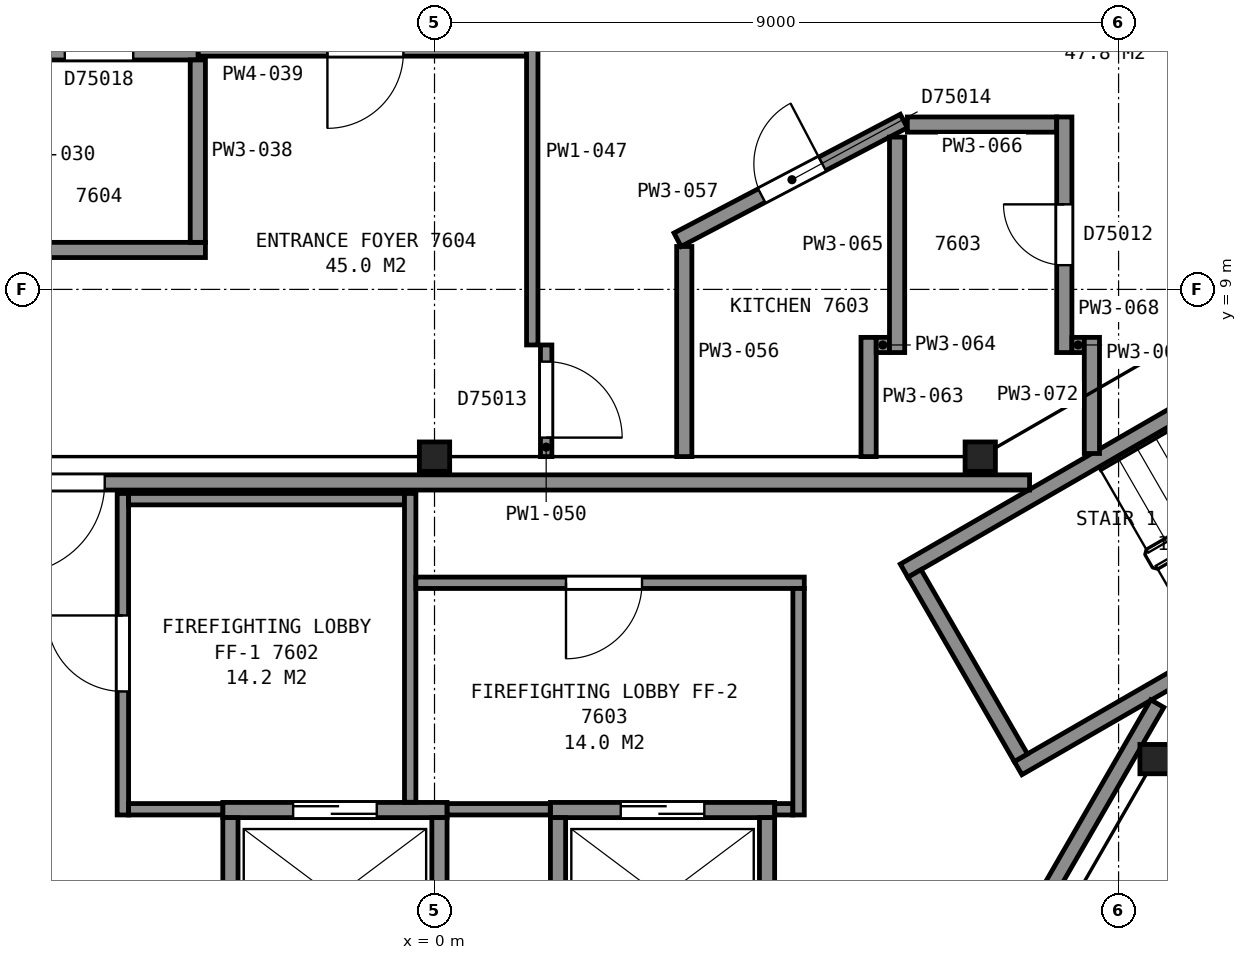
"""IFC4 building model, lengths in metres.
Left out: names, types, materials, properties, quantities, classifications, styles, units other than length and angle.
Written with IfcOpenShell. Run it as: python <this file> out.ifc"""

import sys

from ifc_helpers import new_model, si_unit, direction, frame, frame_2d, origin, origin_2d, place, context, subcontext, project, spatial, rectangle, i_section, extrude, element, fill, save


model = new_model("IFC4")
c1 = context("Model", 3, precision=1e-05, world=origin(), true_north=direction((0.0, 1.0)))
c2 = subcontext(c1, "Body", "Model", "MODEL_VIEW")
j1 = project(units=[si_unit("LENGTHUNIT", "METRE"), si_unit("PLANEANGLEUNIT", "RADIAN")], contexts=[c1])
p1 = place(None, origin())
s1 = spatial("IfcSite", under=j1, at=p1, CompositionType="ELEMENT")
p2 = place(p1, origin())
s2 = spatial("IfcBuilding", under=s1, at=p2, CompositionType="ELEMENT")
p3 = place(p2, frame((0.0, 0.0, 301.0)))
s3 = spatial("IfcBuildingStorey", under=s2, at=p3, CompositionType="ELEMENT", Elevation=301.0)
for number, where, z_axis, x_axis in (
    (1, (9.48, 2.82, 0.0), (0.0, 0.0, 1.0), (1.0, 0.0, 0.0)),
    (2, (7.18, 6.8, 0.0), (0.0, 0.0, 1.0), (1.0, 0.0, 0.0)),
    (3, (0.0, 6.8, 0.0), (0.0, 0.0, 1.0), (1.0, 0.0, 0.0)),
):
    element("IfcColumn", number, at=place(p3, frame(where, z_axis=z_axis, x_axis=x_axis)), inside=s3, PredefinedType="COLUMN", context=c2, shape_type="SweptSolid", body=[
        extrude(i_section(OverallWidth=0.399, OverallDepth=0.386, WebThickness=0.021, FlangeThickness=0.033, FilletRadius=0.015, at=origin_2d()), origin(), (0.0, 0.0, 1.0), 3.7),
    ])
for number, where, z_axis, x_axis in (
    (4, (6.178, 5.299, 0.0), (0.0, 0.0, 1.0), (0.866, 0.5, 0.0)),
    (5, (7.678, 2.701, 0.0), (0.0, 0.0, 1.0), (0.866, 0.5, 0.0)),
):
    element("IfcWall", number, at=place(p3, frame(where, z_axis=z_axis, x_axis=x_axis)), inside=s3, PredefinedType="PARTITIONING", context=c2, shape_type="SweptSolid", body=[
        extrude(rectangle(XDim=7.2, YDim=0.2, at=frame_2d((3.6, 0.0))), origin(), (0.0, 0.0, 1.0), 3.45),
    ])
p4 = place(p3, frame((7.715, 2.838, 0.0), z_axis=(0.0, 0.0, 1.0), x_axis=(-0.500049511043, 0.865996816683, 0.0)))
e6 = element("IfcWall", 6, at=p4, inside=s3, PredefinedType="PARTITIONING", context=c2, shape_type="SweptSolid", body=[
    extrude(rectangle(XDim=2.8, YDim=0.2, at=frame_2d((1.4, 0.0))), origin(), (0.0, 0.0, 1.0), 3.45),
])
p5 = place(p3, frame((-2.785, 2.15, 0.0), z_axis=(0.0, 0.0, 1.0), x_axis=(1.0, 0.0, 0.0)))
e7 = element("IfcWall", 7, at=p5, inside=s3, PredefinedType="PARTITIONING", context=c2, shape_type="SweptSolid", body=[
    extrude(rectangle(XDim=2.95, YDim=0.2, at=frame_2d((1.475, 0.0))), origin(), (0.0, 0.0, 1.0), 3.7),
])
p6 = place(p5, frame((0.925, 0.0, 0.0)))
e8 = element("IfcOpeningElement", 8, at=p6, cuts=e7, PredefinedType="OPENING", context=c2, shape_type="SweptSolid", body=[
    extrude(rectangle(XDim=1.1, YDim=2.1, at=frame_2d((0.55, 1.05))), frame((0.0, 0.11, 0.0), z_axis=(0.0, -1.0, 0.0), x_axis=(1.0, 0.0, 0.0)), (0.0, 0.0, 1.0), 0.22),
])
p7 = place(p3, frame((1.525, 2.15, 0.0), z_axis=(0.0, 0.0, 1.0), x_axis=(1.0, 0.0, 0.0)))
e9 = element("IfcWall", 9, at=p7, inside=s3, PredefinedType="PARTITIONING", context=c2, shape_type="SweptSolid", body=[
    extrude(rectangle(XDim=2.95, YDim=0.2, at=frame_2d((1.475, 0.0))), origin(), (0.0, 0.0, 1.0), 3.7),
])
p8 = place(p7, frame((0.925, 0.0, 0.0)))
e10 = element("IfcOpeningElement", 10, at=p8, cuts=e9, PredefinedType="OPENING", context=c2, shape_type="SweptSolid", body=[
    extrude(rectangle(XDim=1.1, YDim=2.1, at=frame_2d((0.55, 1.05))), frame((0.0, 0.11, 0.0), z_axis=(0.0, -1.0, 0.0), x_axis=(1.0, 0.0, 0.0)), (0.0, 0.0, 1.0), 0.22),
])
for number, where, z_axis, x_axis in (
    (11, (4.375, 0.1, 0.0), (0.0, 0.0, 1.0), (0.0, 1.0, 0.0)),
    (12, (1.625, 0.1, 0.0), (0.0, 0.0, 1.0), (0.0, 1.0, 0.0)),
    (13, (0.065, 0.1, 0.0), (0.0, 0.0, 1.0), (0.0, 1.0, 0.0)),
    (14, (-2.685, 0.1, 0.0), (0.0, 0.0, 1.0), (0.0, 1.0, 0.0)),
):
    element("IfcWall", number, at=place(p3, frame(where, z_axis=z_axis, x_axis=x_axis)), inside=s3, PredefinedType="PARTITIONING", context=c2, shape_type="SweptSolid", body=[
        extrude(rectangle(XDim=1.95, YDim=0.2, at=frame_2d((0.975, 0.0))), origin(), (0.0, 0.0, 1.0), 3.7),
    ])
p9 = place(p3, frame((7.829, 6.46, 0.0), z_axis=(0.0, 0.0, 1.0), x_axis=(-1.0, 0.0, 0.0)))
e15 = element("IfcWall", 15, at=p9, inside=s3, PredefinedType="PARTITIONING", context=c2, shape_type="SweptSolid", body=[
    extrude(rectangle(XDim=15.658, YDim=0.2, at=frame_2d((7.829, 0.0))), origin(), (0.0, 0.0, 1.0), 3.45),
])
p10 = place(p9, frame((12.168, 0.0, 0.0)))
e16 = element("IfcOpeningElement", 16, at=p10, cuts=e15, PredefinedType="OPENING", context=c2, shape_type="SweptSolid", body=[
    extrude(rectangle(XDim=1.2, YDim=2.1, at=frame_2d((0.6, 1.05))), frame((0.0, 0.11, 0.0), z_axis=(0.0, -1.0, 0.0), x_axis=(1.0, 0.0, 0.0)), (0.0, 0.0, 1.0), 0.22),
])
p11 = place(p3, frame((-4.1, 2.085, 0.0), z_axis=(0.0, 0.0, 1.0), x_axis=(0.0, 1.0, 0.0)))
e17 = element("IfcWall", 17, at=p11, inside=s3, PredefinedType="PARTITIONING", context=c2, shape_type="SweptSolid", body=[
    extrude(rectangle(XDim=4.23, YDim=0.15, at=frame_2d((2.115, 0.0))), origin(), (0.0, 0.0, 1.0), 3.45),
])
p12 = place(p11, frame((1.625, 0.0, 0.0)))
e18 = element("IfcOpeningElement", 18, at=p12, cuts=e17, PredefinedType="OPENING", context=c2, shape_type="SweptSolid", body=[
    extrude(rectangle(XDim=1.0, YDim=2.1, at=frame_2d((0.5, 1.05))), frame((0.0, 0.085, 0.0), z_axis=(0.0, -1.0, 0.0), x_axis=(1.0, 0.0, 0.0)), (0.0, 0.0, 1.0), 0.17),
])
p13 = place(p3, frame((-4.025, 2.16, 0.0), z_axis=(0.0, 0.0, 1.0), x_axis=(1.0, 0.0, 0.0)))
e19 = element("IfcWall", 19, at=p13, inside=s3, PredefinedType="PARTITIONING", context=c2, shape_type="SweptSolid", body=[
    extrude(rectangle(XDim=1.238, YDim=0.15, at=frame_2d((0.619, 0.0))), origin(), (0.0, 0.0, 1.0), 3.45),
])
p14 = place(p3, frame((-4.025, 6.24, 0.0), z_axis=(0.0, 0.0, 1.0), x_axis=(1.0, 0.0, 0.0)))
e20 = element("IfcWall", 20, at=p14, inside=s3, PredefinedType="PARTITIONING", context=c2, shape_type="SweptSolid", body=[
    extrude(rectangle(XDim=3.63, YDim=0.15, at=frame_2d((1.815, 0.0))), origin(), (0.0, 0.0, 1.0), 3.45),
])
p15 = place(p3, frame((-0.32, 2.252, 0.0), z_axis=(0.0, 0.0, 1.0), x_axis=(0.0, 1.0, 0.0)))
e21 = element("IfcWall", 21, at=p15, inside=s3, PredefinedType="PARTITIONING", context=c2, shape_type="SweptSolid", body=[
    extrude(rectangle(XDim=4.063, YDim=0.15, at=frame_2d((2.031, 0.0))), origin(), (0.0, 0.0, 1.0), 3.45),
])
p16 = place(p3, frame((-0.245, 5.14, 0.0), z_axis=(0.0, 0.0, 1.0), x_axis=(1.0, 0.0, 0.0)))
e22 = element("IfcWall", 22, at=p16, inside=s3, PredefinedType="PARTITIONING", context=c2, shape_type="SweptSolid", body=[
    extrude(rectangle(XDim=5.11, YDim=0.15, at=frame_2d((2.555, 0.0))), origin(), (0.0, 0.0, 1.0), 3.45),
])
p17 = place(p16, frame((1.975, 0.0, 0.0)))
e23 = element("IfcOpeningElement", 23, at=p17, cuts=e22, PredefinedType="OPENING", context=c2, shape_type="SweptSolid", body=[
    extrude(rectangle(XDim=1.0, YDim=2.1, at=frame_2d((0.5, 1.05))), frame((0.0, 0.085, 0.0), z_axis=(0.0, -1.0, 0.0), x_axis=(1.0, 0.0, 0.0)), (0.0, 0.0, 1.0), 0.17),
])
p18 = place(p3, frame((0.167, 2.16, 0.0), z_axis=(0.0, 0.0, 1.0), x_axis=(1.0, 0.0, 0.0)))
e24 = element("IfcWall", 24, at=p18, inside=s3, PredefinedType="PARTITIONING", context=c2, shape_type="SweptSolid", body=[
    extrude(rectangle(XDim=1.356, YDim=0.15, at=frame_2d((0.678, 0.0))), origin(), (0.0, 0.0, 1.0), 3.45),
])
p19 = place(p3, frame((3.828, -6.29, 0.0), z_axis=(0.0, 0.0, 1.0), x_axis=(0.499979739078, 0.866037101117, 0.0)))
e25 = element("IfcWall", 25, at=p19, inside=s3, PredefinedType="PARTITIONING", context=c2, shape_type="SweptSolid", body=[
    extrude(rectangle(XDim=11.363, YDim=0.2, at=frame_2d((5.681, 0.0))), origin(), (0.0, 0.0, 1.0), 3.45),
])
p20 = place(p19, frame((0.55, 0.0, 0.0)))
e26 = element("IfcOpeningElement", 26, at=p20, cuts=e25, PredefinedType="OPENING", context=c2, shape_type="SweptSolid", body=[
    extrude(rectangle(XDim=1.2, YDim=2.1, at=frame_2d((0.6, 1.05))), frame((0.0, 0.11, 0.0), z_axis=(0.0, -1.0, 0.0), x_axis=(1.0, 0.0, 0.0)), (0.0, 0.0, 1.0), 0.22),
])
p21 = place(p3, frame((4.477, 2.16, 0.0), z_axis=(0.0, 0.0, 1.0), x_axis=(1.0, 0.0, 0.0)))
e27 = element("IfcWall", 27, at=p21, inside=s3, PredefinedType="PARTITIONING", context=c2, shape_type="SweptSolid", body=[
    extrude(rectangle(XDim=0.238, YDim=0.15, at=frame_2d((0.119, 0.0))), origin(), (0.0, 0.0, 1.0), 3.45),
])
p22 = place(p3, frame((4.79, 2.085, 0.0), z_axis=(0.0, 0.0, 1.0), x_axis=(0.0, 1.0, 0.0)))
e28 = element("IfcWall", 28, at=p22, inside=s3, PredefinedType="PARTITIONING", context=c2, shape_type="SweptSolid", body=[
    extrude(rectangle(XDim=2.98, YDim=0.15, at=frame_2d((1.49, 0.0))), origin(), (0.0, 0.0, 1.0), 3.45),
])
p23 = place(p3, frame((-10.838, 9.519, 0.0), z_axis=(0.0, 0.0, 1.0), x_axis=(1.0, 0.0, 0.0)))
e29 = element("IfcWall", 29, at=p23, inside=s3, PredefinedType="PARTITIONING", context=c2, shape_type="SweptSolid", body=[
    extrude(rectangle(XDim=7.824, YDim=0.2, at=frame_2d((3.912, 0.0))), origin(), (0.0, 0.0, 1.0), 2.723),
])
p24 = place(p3, frame((-3.109, 12.119, 0.0), z_axis=(0.0, 0.0, 1.0), x_axis=(-1.0, 0.0, 0.0)))
e30 = element("IfcWall", 30, at=p24, inside=s3, PredefinedType="PARTITIONING", context=c2, shape_type="SweptSolid", body=[
    extrude(rectangle(XDim=2.605, YDim=0.2, at=frame_2d((1.303, 0.0))), origin(), (0.0, 0.0, 1.0), 2.723),
])
p25 = place(p24, frame((0.855, 0.0, 0.0)))
e31 = element("IfcOpeningElement", 31, at=p25, cuts=e30, PredefinedType="OPENING", context=c2, shape_type="SweptSolid", body=[
    extrude(rectangle(XDim=0.9, YDim=2.1, at=frame_2d((0.45, 1.05))), frame((0.0, 0.11, 0.0), z_axis=(0.0, -1.0, 0.0), x_axis=(1.0, 0.0, 0.0)), (0.0, 0.0, 1.0), 0.22),
])
p26 = place(p3, frame((-3.114, 9.619, 0.0), z_axis=(0.0, 0.0, 1.0), x_axis=(0.0, 1.0, 0.0)))
e32 = element("IfcWall", 32, at=p26, inside=s3, PredefinedType="PARTITIONING", context=c2, shape_type="SweptSolid", body=[
    extrude(rectangle(XDim=2.4, YDim=0.2, at=frame_2d((1.2, 0.0))), origin(), (0.0, 0.0, 1.0), 2.723),
])
p27 = place(p3, frame((-3.109, 12.119, 0.0), z_axis=(0.0, 0.0, 1.0), x_axis=(1.0, 0.0, 0.0)))
e33 = element("IfcWall", 33, at=p27, inside=s3, PredefinedType="PARTITIONING", context=c2, shape_type="SweptSolid", body=[
    extrude(rectangle(XDim=4.32, YDim=0.1, at=frame_2d((2.16, 0.0))), origin(), (0.0, 0.0, 1.0), 2.723),
])
p28 = place(p27, frame((1.7, 0.0, 0.0)))
e34 = element("IfcOpeningElement", 34, at=p28, cuts=e33, PredefinedType="OPENING", context=c2, shape_type="SweptSolid", body=[
    extrude(rectangle(XDim=1.0, YDim=2.1, at=frame_2d((0.5, 1.05))), frame((0.0, 0.06, 0.0), z_axis=(0.0, -1.0, 0.0), x_axis=(1.0, 0.0, 0.0)), (0.0, 0.0, 1.0), 0.12),
])
p29 = place(p3, frame((1.286, 8.269, 0.0), z_axis=(0.0, 0.0, 1.0), x_axis=(0.0, 1.0, 0.0)))
e35 = element("IfcWall", 35, at=p29, inside=s3, PredefinedType="PARTITIONING", context=c2, shape_type="SweptSolid", body=[
    extrude(rectangle(XDim=5.082, YDim=0.15, at=frame_2d((2.541, 0.0))), origin(), (0.0, 0.0, 1.0), 2.723),
])
p30 = place(p3, frame((1.469, 8.269, 0.0), z_axis=(0.0, 0.0, 1.0), x_axis=(0.0, -1.0, 0.0)))
e36 = element("IfcWall", 36, at=p30, inside=s3, PredefinedType="PARTITIONING", context=c2, shape_type="SweptSolid", body=[
    extrude(rectangle(XDim=1.469, YDim=0.15, at=frame_2d((0.734, 0.0))), origin(), (0.0, 0.0, 1.0), 2.723),
])
p31 = place(p30, frame((0.219, 0.0, 0.0)))
e37 = element("IfcOpeningElement", 37, at=p31, cuts=e36, PredefinedType="OPENING", context=c2, shape_type="SweptSolid", body=[
    extrude(rectangle(XDim=1.0, YDim=2.1, at=frame_2d((0.5, 1.05))), frame((0.0, 0.085, 0.0), z_axis=(0.0, -1.0, 0.0), x_axis=(1.0, 0.0, 0.0)), (0.0, 0.0, 1.0), 0.17),
])
p32 = place(p3, frame((3.286, 6.8, 0.0), z_axis=(0.0, 0.0, 1.0), x_axis=(0.0, 1.0, 0.0)))
e38 = element("IfcWall", 38, at=p32, inside=s3, PredefinedType="PARTITIONING", context=c2, shape_type="SweptSolid", body=[
    extrude(rectangle(XDim=2.765, YDim=0.2, at=frame_2d((1.382, 0.0))), origin(), (0.0, 0.0, 1.0), 2.723),
])
p33 = place(p3, frame((6.175, 11.216, 0.0), z_axis=(0.0, 0.0, 1.0), x_axis=(-0.885512941371, -0.464614712062, 0.0)))
e39 = element("IfcWall", 39, at=p33, inside=s3, PredefinedType="PARTITIONING", context=c2, shape_type="SweptSolid", body=[
    extrude(rectangle(XDim=3.362, YDim=0.2, at=frame_2d((1.681, 0.0))), origin(), (0.0, 0.0, 1.0), 2.723),
])
p34 = place(p33, frame((1.212, 0.0, 0.0)))
e40 = element("IfcOpeningElement", 40, at=p34, cuts=e39, PredefinedType="OPENING", context=c2, shape_type="SweptSolid", body=[
    extrude(rectangle(XDim=0.9, YDim=2.1, at=frame_2d((0.45, 1.05))), frame((0.0, 0.11, 0.0), z_axis=(0.0, -1.0, 0.0), x_axis=(1.0, 0.0, 0.0)), (0.0, 0.0, 1.0), 0.22),
])
p35 = place(p3, frame((5.711, 6.8, 0.0), z_axis=(0.0, 0.0, 1.0), x_axis=(0.0, 1.0, 0.0)))
e41 = element("IfcWall", 41, at=p35, inside=s3, PredefinedType="PARTITIONING", context=c2, shape_type="SweptSolid", body=[
    extrude(rectangle(XDim=1.569, YDim=0.2, at=frame_2d((0.784, 0.0))), origin(), (0.0, 0.0, 1.0), 2.723),
])
p36 = place(p3, frame((5.811, 8.269, 0.0), z_axis=(0.0, 0.0, 1.0), x_axis=(1.0, 0.0, 0.0)))
e42 = element("IfcWall", 42, at=p36, inside=s3, PredefinedType="PARTITIONING", context=c2, shape_type="SweptSolid", body=[
    extrude(rectangle(XDim=0.175, YDim=0.2, at=frame_2d((0.087, 0.0))), origin(), (0.0, 0.0, 1.0), 2.723),
])
p37 = place(p3, frame((6.086, 8.169, 0.0), z_axis=(0.0, 0.0, 1.0), x_axis=(0.0, 1.0, 0.0)))
e43 = element("IfcWall", 43, at=p37, inside=s3, PredefinedType="PARTITIONING", context=c2, shape_type="SweptSolid", body=[
    extrude(rectangle(XDim=2.835, YDim=0.2, at=frame_2d((1.417, 0.0))), origin(), (0.0, 0.0, 1.0), 2.723),
])
p38 = place(p3, frame((6.221, 11.169, 0.0), z_axis=(0.0, 0.0, 1.0), x_axis=(1.0, 0.0, 0.0)))
e44 = element("IfcWall", 44, at=p38, inside=s3, PredefinedType="PARTITIONING", context=c2, shape_type="SweptSolid", body=[
    extrude(rectangle(XDim=1.965, YDim=0.2, at=frame_2d((0.982, 0.0))), origin(), (0.0, 0.0, 1.0), 2.723),
])
p39 = place(p3, frame((8.286, 8.169, 0.0), z_axis=(0.0, 0.0, 1.0), x_axis=(0.0, 1.0, 0.0)))
e45 = element("IfcWall", 45, at=p39, inside=s3, PredefinedType="PARTITIONING", context=c2, shape_type="SweptSolid", body=[
    extrude(rectangle(XDim=3.1, YDim=0.2, at=frame_2d((1.55, 0.0))), origin(), (0.0, 0.0, 1.0), 2.723),
])
p40 = place(p39, frame((1.15, 0.0, 0.0)))
e46 = element("IfcOpeningElement", 46, at=p40, cuts=e45, PredefinedType="OPENING", context=c2, shape_type="SweptSolid", body=[
    extrude(rectangle(XDim=0.8, YDim=2.1, at=frame_2d((0.4, 1.05))), frame((0.0, 0.11, 0.0), z_axis=(0.0, -1.0, 0.0), x_axis=(1.0, 0.0, 0.0)), (0.0, 0.0, 1.0), 0.22),
])
p41 = place(p3, frame((8.386, 8.269, 0.0), z_axis=(0.0, 0.0, 1.0), x_axis=(1.0, 0.0, 0.0)))
e47 = element("IfcWall", 47, at=p41, inside=s3, PredefinedType="PARTITIONING", context=c2, shape_type="SweptSolid", body=[
    extrude(rectangle(XDim=0.163, YDim=0.2, at=frame_2d((0.082, 0.0))), origin(), (0.0, 0.0, 1.0), 2.723),
])
p42 = place(p3, frame((8.649, 6.841, 0.0), z_axis=(0.0, 0.0, 1.0), x_axis=(0.0, 1.0, 0.0)))
e48 = element("IfcWall", 48, at=p42, inside=s3, PredefinedType="PARTITIONING", context=c2, shape_type="SweptSolid", body=[
    extrude(rectangle(XDim=1.528, YDim=0.2, at=frame_2d((0.764, 0.0))), origin(), (0.0, 0.0, 1.0), 2.723),
])
p43 = place(p6, origin())
e49 = element("IfcDoor", 49, at=p43, inside=s3, OperationType="SLIDING_TO_LEFT", PredefinedType="DOOR", context=c2, shape_type="SweptSolid", body=[
    extrude(rectangle(XDim=1.1, YDim=2.1, at=frame_2d((0.55, 1.05))), frame((0.0, 0.025, 0.0), z_axis=(0.0, -1.0, 0.0), x_axis=(1.0, 0.0, 0.0)), (0.0, 0.0, 1.0), 0.05),
])
fill(e8, e49)
p44 = place(p8, origin())
e50 = element("IfcDoor", 50, at=p44, inside=s3, OperationType="SLIDING_TO_RIGHT", PredefinedType="DOOR", context=c2, shape_type="SweptSolid", body=[
    extrude(rectangle(XDim=1.1, YDim=2.1, at=frame_2d((0.55, 1.05))), frame((0.0, 0.025, 0.0), z_axis=(0.0, -1.0, 0.0), x_axis=(1.0, 0.0, 0.0)), (0.0, 0.0, 1.0), 0.05),
])
fill(e10, e50)
p45 = place(p10, origin())
e51 = element("IfcDoor", 51, at=p45, inside=s3, OperationType="SINGLE_SWING_RIGHT", PredefinedType="DOOR", context=c2, shape_type="SweptSolid", body=[
    extrude(rectangle(XDim=1.2, YDim=2.1, at=frame_2d((0.6, 1.05))), frame((0.0, 0.025, 0.0), z_axis=(0.0, -1.0, 0.0), x_axis=(1.0, 0.0, 0.0)), (0.0, 0.0, 1.0), 0.05),
])
fill(e16, e51)
p46 = place(p12, origin())
e52 = element("IfcDoor", 52, at=p46, inside=s3, OperationType="SINGLE_SWING_RIGHT", PredefinedType="DOOR", context=c2, shape_type="SweptSolid", body=[
    extrude(rectangle(XDim=1.0, YDim=2.1, at=frame_2d((0.5, 1.05))), frame((0.0, 0.025, 0.0), z_axis=(0.0, -1.0, 0.0), x_axis=(1.0, 0.0, 0.0)), (0.0, 0.0, 1.0), 0.05),
])
fill(e18, e52)
p47 = place(p17, origin())
e53 = element("IfcDoor", 53, at=p47, inside=s3, OperationType="SINGLE_SWING_LEFT", PredefinedType="DOOR", context=c2, shape_type="SweptSolid", body=[
    extrude(rectangle(XDim=1.0, YDim=2.1, at=frame_2d((0.5, 1.05))), frame((0.0, 0.025, 0.0), z_axis=(0.0, -1.0, 0.0), x_axis=(1.0, 0.0, 0.0)), (0.0, 0.0, 1.0), 0.05),
])
fill(e23, e53)
p48 = place(p25, origin())
e54 = element("IfcDoor", 54, at=p48, inside=s3, OperationType="SINGLE_SWING_LEFT", PredefinedType="DOOR", context=c2, shape_type="SweptSolid", body=[
    extrude(rectangle(XDim=0.9, YDim=2.1, at=frame_2d((0.45, 1.05))), frame((0.0, 0.025, 0.0), z_axis=(0.0, -1.0, 0.0), x_axis=(1.0, 0.0, 0.0)), (0.0, 0.0, 1.0), 0.05),
])
fill(e31, e54)
p49 = place(p28, origin())
e55 = element("IfcDoor", 55, at=p49, inside=s3, OperationType="SINGLE_SWING_LEFT", PredefinedType="DOOR", context=c2, shape_type="SweptSolid", body=[
    extrude(rectangle(XDim=1.0, YDim=2.1, at=frame_2d((0.5, 1.05))), frame((0.0, 0.025, 0.0), z_axis=(0.0, -1.0, 0.0), x_axis=(1.0, 0.0, 0.0)), (0.0, 0.0, 1.0), 0.05),
])
fill(e34, e55)
p50 = place(p31, origin())
e56 = element("IfcDoor", 56, at=p50, inside=s3, OperationType="SINGLE_SWING_RIGHT", PredefinedType="DOOR", context=c2, shape_type="SweptSolid", body=[
    extrude(rectangle(XDim=1.0, YDim=2.1, at=frame_2d((0.5, 1.05))), frame((0.0, 0.025, 0.0), z_axis=(0.0, -1.0, 0.0), x_axis=(1.0, 0.0, 0.0)), (0.0, 0.0, 1.0), 0.05),
])
fill(e37, e56)
p51 = place(p34, origin())
e57 = element("IfcDoor", 57, at=p51, inside=s3, OperationType="SINGLE_SWING_LEFT", PredefinedType="DOOR", context=c2, shape_type="SweptSolid", body=[
    extrude(rectangle(XDim=0.9, YDim=2.1, at=frame_2d((0.45, 1.05))), frame((0.0, 0.025, 0.0), z_axis=(0.0, -1.0, 0.0), x_axis=(1.0, 0.0, 0.0)), (0.0, 0.0, 1.0), 0.05),
])
fill(e40, e57)
p52 = place(p40, origin())
e58 = element("IfcDoor", 58, at=p52, inside=s3, OperationType="SINGLE_SWING_RIGHT", PredefinedType="DOOR", context=c2, shape_type="SweptSolid", body=[
    extrude(rectangle(XDim=0.8, YDim=2.1, at=frame_2d((0.4, 1.05))), frame((0.0, 0.025, 0.0), z_axis=(0.0, -1.0, 0.0), x_axis=(1.0, 0.0, 0.0)), (0.0, 0.0, 1.0), 0.05),
])
fill(e46, e58)
save(model, sys.argv[1])
